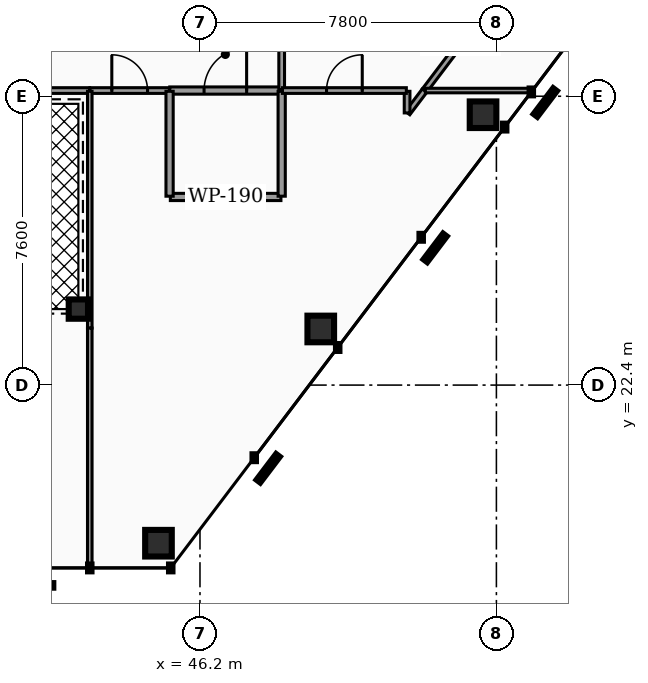
"""IFC4 building model, lengths in metres.
Left out: names, types, materials, properties, quantities, classifications, styles, units other than length and angle.
Written with IfcOpenShell. Run it as: python <this file> out.ifc"""

import sys

from ifc_helpers import new_model, si_unit, direction, frame, frame_2d, origin, origin_2d, place, context, subcontext, project, spatial, rectangle, hollow_rectangle, hollow_circle, extrude, element, fill, save


model = new_model("IFC4")
c1 = context("Model", 3, precision=1e-05, world=origin(), true_north=direction((0.0, 1.0)))
c2 = subcontext(c1, "Body", "Model", "MODEL_VIEW")
j1 = project(units=[si_unit("LENGTHUNIT", "METRE"), si_unit("PLANEANGLEUNIT", "RADIAN")], contexts=[c1])
p1 = place(None, origin())
s1 = spatial("IfcSite", under=j1, at=p1, CompositionType="ELEMENT")
p2 = place(p1, origin())
s2 = spatial("IfcBuilding", under=s1, at=p2, CompositionType="ELEMENT")
p3 = place(p2, frame((0.0, 0.0, 190.74)))
s3 = spatial("IfcBuildingStorey", under=s2, at=p3, CompositionType="ELEMENT", Elevation=190.74)
p4 = place(p3, frame((45.108, 18.239, 0.0), z_axis=(-0.068926976819, 0.037191847909, 0.996928201184), x_axis=(-0.474864985459, -0.880058660309, 0.0)))
e1 = element("IfcColumn", 1, at=p4, inside=s3, PredefinedType="COLUMN", context=c2, shape_type="SweptSolid", body=[
    extrude(hollow_rectangle(XDim=0.7, YDim=0.7, WallThickness=0.035, at=origin_2d()), origin(), (0.0, 0.0, 1.0), 3.4),
])
p5 = place(p3, frame((49.378, 23.876, 0.0), z_axis=(-0.060531031613, 0.048180690644, 0.997002816075), x_axis=(-0.622768998319, -0.782405760928, 0.0)))
e2 = element("IfcColumn", 2, at=p5, inside=s3, PredefinedType="COLUMN", context=c2, shape_type="SweptSolid", body=[
    extrude(hollow_rectangle(XDim=0.7, YDim=0.7, WallThickness=0.035, at=origin_2d()), origin(), (0.0, 0.0, 1.0), 3.4),
])
p6 = place(p3, frame((53.649, 29.514, 0.0), z_axis=(-0.0521952381, 0.059231184914, 0.996878790954), x_axis=(-0.75026232765, -0.661140257214, 0.0)))
e3 = element("IfcColumn", 3, at=p6, inside=s3, PredefinedType="COLUMN", context=c2, shape_type="SweptSolid", body=[
    extrude(hollow_rectangle(XDim=0.7, YDim=0.7, WallThickness=0.035, at=origin_2d()), origin(), (0.0, 0.0, 1.0), 3.4),
])
p7 = place(p3, frame((43.0, 24.4, 0.0), z_axis=(0.0, 0.0, 1.0), x_axis=(1.0, 0.0, 0.0)))
e4 = element("IfcColumn", 4, at=p7, inside=s3, PredefinedType="COLUMN", context=c2, shape_type="SweptSolid", body=[
    extrude(hollow_circle(Radius=0.254, WallThickness=0.02, at=origin_2d()), origin(), (0.0, 0.0, 1.0), 3.39),
])
p8 = place(p3, frame((45.405, 30.15, 0.0), z_axis=(0.0, 0.0, 1.0), x_axis=(1.0, 0.0, 0.0)))
e5 = element("IfcWall", 5, at=p8, inside=s3, PredefinedType="PARTITIONING", context=c2, shape_type="SweptSolid", body=[
    extrude(rectangle(XDim=2.925, YDim=0.19, at=frame_2d((1.462, 0.0))), origin(), (0.0, 0.0, 1.0), 2.347),
])
p9 = place(p8, frame((0.903, 0.0, 0.0)))
e6 = element("IfcOpeningElement", 6, at=p9, cuts=e5, PredefinedType="OPENING", context=c2, shape_type="SweptSolid", body=[
    extrude(rectangle(XDim=1.12, YDim=2.05, at=frame_2d((0.56, 1.025))), frame((0.0, 0.105, 0.0), z_axis=(0.0, -1.0, 0.0), x_axis=(1.0, 0.0, 0.0)), (0.0, 0.0, 1.0), 0.21),
])
p10 = place(p3, frame((48.35, 30.17, 0.0), z_axis=(0.0, 0.0, 1.0), x_axis=(0.0, 1.0, 0.0)))
e7 = element("IfcWall", 7, at=p10, inside=s3, PredefinedType="PARTITIONING", context=c2, shape_type="SweptSolid", body=[
    extrude(rectangle(XDim=3.06, YDim=0.15, at=frame_2d((1.53, 0.0))), origin(), (0.0, 0.0, 1.0), 2.347),
])
p11 = place(p10, frame((1.06, 0.0, 0.0)))
e8 = element("IfcOpeningElement", 8, at=p11, cuts=e7, PredefinedType="OPENING", context=c2, shape_type="SweptSolid", body=[
    extrude(rectangle(XDim=0.94, YDim=2.05, at=frame_2d((0.47, 1.025))), frame((0.0, 0.085, 0.0), z_axis=(0.0, -1.0, 0.0), x_axis=(1.0, 0.0, 0.0)), (0.0, 0.0, 1.0), 0.17),
])
p12 = place(p3, frame((35.385, 30.15, 0.0), z_axis=(0.0, 0.0, 1.0), x_axis=(1.0, 0.0, 0.0)))
e9 = element("IfcWall", 9, at=p12, inside=s3, PredefinedType="PARTITIONING", context=c2, shape_type="SweptSolid", body=[
    extrude(rectangle(XDim=7.91, YDim=0.15, at=frame_2d((3.955, 0.0))), origin(), (0.0, 0.0, 1.0), 2.347),
])
p13 = place(p12, frame((0.25, 0.0, 0.0)))
e10 = element("IfcOpeningElement", 10, at=p13, cuts=e9, PredefinedType="OPENING", context=c2, shape_type="SweptSolid", body=[
    extrude(rectangle(XDim=0.88, YDim=2.05, at=frame_2d((0.44, 1.025))), frame((0.0, 0.085, 0.0), z_axis=(0.0, -1.0, 0.0), x_axis=(1.0, 0.0, 0.0)), (0.0, 0.0, 1.0), 0.17),
])
p14 = place(p3, frame((43.305, 30.15, 0.0), z_axis=(0.0, 0.0, 1.0), x_axis=(1.0, 0.0, 0.0)))
e11 = element("IfcWall", 11, at=p14, inside=s3, PredefinedType="PARTITIONING", context=c2, shape_type="SweptSolid", body=[
    extrude(rectangle(XDim=2.09, YDim=0.15, at=frame_2d((1.045, 0.0))), origin(), (0.0, 0.0, 1.0), 2.347),
])
p15 = place(p14, frame((0.575, 0.0, 0.0)))
e12 = element("IfcOpeningElement", 12, at=p15, cuts=e11, PredefinedType="OPENING", context=c2, shape_type="SweptSolid", body=[
    extrude(rectangle(XDim=0.94, YDim=2.05, at=frame_2d((0.47, 1.025))), frame((0.0, 0.085, 0.0), z_axis=(0.0, -1.0, 0.0), x_axis=(1.0, 0.0, 0.0)), (0.0, 0.0, 1.0), 0.17),
])
p16 = place(p3, frame((45.42, 27.35, 0.0), z_axis=(0.0, 0.0, 1.0), x_axis=(1.0, 0.0, 0.0)))
e13 = element("IfcWall", 13, at=p16, inside=s3, PredefinedType="PARTITIONING", context=c2, shape_type="SweptSolid", body=[
    extrude(rectangle(XDim=2.91, YDim=0.19, at=frame_2d((1.455, 0.0))), origin(), (0.0, 0.0, 1.0), 2.347),
])
for number, where, z_axis, x_axis in (
    (14, (45.4, 27.37, 0.0), (0.0, 0.0, 1.0), (0.0, 1.0, 0.0)),
    (15, (48.35, 27.37, 0.0), (0.0, 0.0, 1.0), (0.0, 1.0, 0.0)),
):
    element("IfcWall", number, at=place(p3, frame(where, z_axis=z_axis, x_axis=x_axis)), inside=s3, PredefinedType="PARTITIONING", context=c2, shape_type="SweptSolid", body=[
        extrude(rectangle(XDim=2.76, YDim=0.19, at=frame_2d((1.38, 0.0))), origin(), (0.0, 0.0, 1.0), 2.347),
    ])
p17 = place(p3, frame((51.662, 29.557, 0.0), z_axis=(0.0, 0.0, 1.0), x_axis=(0.603572672845, 0.797307988543, 0.0)))
e16 = element("IfcWall", 16, at=p17, inside=s3, PredefinedType="PARTITIONING", context=c2, shape_type="SweptSolid", body=[
    extrude(rectangle(XDim=0.742, YDim=0.15, at=frame_2d((0.371, 0.0))), origin(), (0.0, 0.0, 1.0), 2.347),
])
p18 = place(p3, frame((51.65, 29.562, 0.0), z_axis=(0.0, 0.0, 1.0), x_axis=(0.0, 1.0, 0.0)))
e17 = element("IfcWall", 17, at=p18, inside=s3, PredefinedType="PARTITIONING", context=c2, shape_type="SweptSolid", body=[
    extrude(rectangle(XDim=0.568, YDim=0.15, at=frame_2d((0.284, 0.0))), origin(), (0.0, 0.0, 1.0), 2.347),
])
p19 = place(p3, frame((48.37, 30.15, 0.0), z_axis=(0.0, 0.0, 1.0), x_axis=(1.0, 0.0, 0.0)))
e18 = element("IfcWall", 18, at=p19, inside=s3, PredefinedType="PARTITIONING", context=c2, shape_type="SweptSolid", body=[
    extrude(rectangle(XDim=3.26, YDim=0.15, at=frame_2d((1.63, 0.0))), origin(), (0.0, 0.0, 1.0), 2.347),
])
p20 = place(p19, frame((1.16, 0.0, 0.0)))
e19 = element("IfcOpeningElement", 19, at=p20, cuts=e18, PredefinedType="OPENING", context=c2, shape_type="SweptSolid", body=[
    extrude(rectangle(XDim=0.94, YDim=2.05, at=frame_2d((0.47, 1.025))), frame((0.0, 0.085, 0.0), z_axis=(0.0, -1.0, 0.0), x_axis=(1.0, 0.0, 0.0)), (0.0, 0.0, 1.0), 0.17),
])
p21 = place(p3, frame((52.114, 30.154, 0.0), z_axis=(0.0, 0.0, 1.0), x_axis=(0.603819819336, 0.797120835116, 0.0)))
e20 = element("IfcWall", 20, at=p21, inside=s3, PredefinedType="PARTITIONING", context=c2, shape_type="SweptSolid", body=[
    extrude(rectangle(XDim=3.103, YDim=0.15, at=frame_2d((1.552, 0.0))), origin(), (0.0, 0.0, 1.0), 2.347),
])
p22 = place(p3, frame((43.3, 23.9, 0.0), z_axis=(0.0, 0.0, 1.0), x_axis=(0.0, 1.0, 0.0)))
e21 = element("IfcWall", 21, at=p22, inside=s3, PredefinedType="PARTITIONING", context=c2, shape_type="SweptSolid", body=[
    extrude(rectangle(XDim=6.23, YDim=0.12, at=frame_2d((3.115, 0.0))), origin(), (0.0, 0.0, 1.0), 2.347),
])
p23 = place(p3, frame((43.3, 17.604, 0.0), z_axis=(0.0, 0.0, 1.0), x_axis=(0.0, 1.0, 0.0)))
e22 = element("IfcWall", 22, at=p23, inside=s3, PredefinedType="PARTITIONING", context=c2, shape_type="SweptSolid", body=[
    extrude(rectangle(XDim=6.295, YDim=0.12, at=frame_2d((3.148, 0.0))), origin(), (0.0, 0.0, 1.0), 2.347),
])
p24 = place(p3, frame((52.131, 30.15, 0.0), z_axis=(0.0, 0.0, 1.0), x_axis=(1.0, 0.0, 0.0)))
e23 = element("IfcWall", 23, at=p24, inside=s3, PredefinedType="PARTITIONING", context=c2, shape_type="SweptSolid", body=[
    extrude(rectangle(XDim=2.8, YDim=0.12, at=frame_2d((1.4, 0.0))), origin(), (0.0, 0.0, 1.0), 2.347),
])
p25 = place(p9, origin())
e24 = element("IfcDoor", 24, at=p25, inside=s3, OperationType="SINGLE_SWING_RIGHT", PredefinedType="DOOR", context=c2, shape_type="SweptSolid", body=[
    extrude(rectangle(XDim=1.12, YDim=2.05, at=frame_2d((0.56, 1.025))), frame((0.0, 0.025, 0.0), z_axis=(0.0, -1.0, 0.0), x_axis=(1.0, 0.0, 0.0)), (0.0, 0.0, 1.0), 0.05),
])
fill(e6, e24)
p26 = place(p15, origin())
e25 = element("IfcDoor", 25, at=p26, inside=s3, OperationType="SINGLE_SWING_LEFT", PredefinedType="DOOR", context=c2, shape_type="SweptSolid", body=[
    extrude(rectangle(XDim=0.94, YDim=2.05, at=frame_2d((0.47, 1.025))), frame((0.0, 0.025, 0.0), z_axis=(0.0, -1.0, 0.0), x_axis=(1.0, 0.0, 0.0)), (0.0, 0.0, 1.0), 0.05),
])
fill(e12, e25)
p27 = place(p20, origin())
e26 = element("IfcDoor", 26, at=p27, inside=s3, OperationType="SINGLE_SWING_RIGHT", PredefinedType="DOOR", context=c2, shape_type="SweptSolid", body=[
    extrude(rectangle(XDim=0.94, YDim=2.05, at=frame_2d((0.47, 1.025))), frame((0.0, 0.025, 0.0), z_axis=(0.0, -1.0, 0.0), x_axis=(1.0, 0.0, 0.0)), (0.0, 0.0, 1.0), 0.05),
])
fill(e19, e26)
save(model, sys.argv[1])
